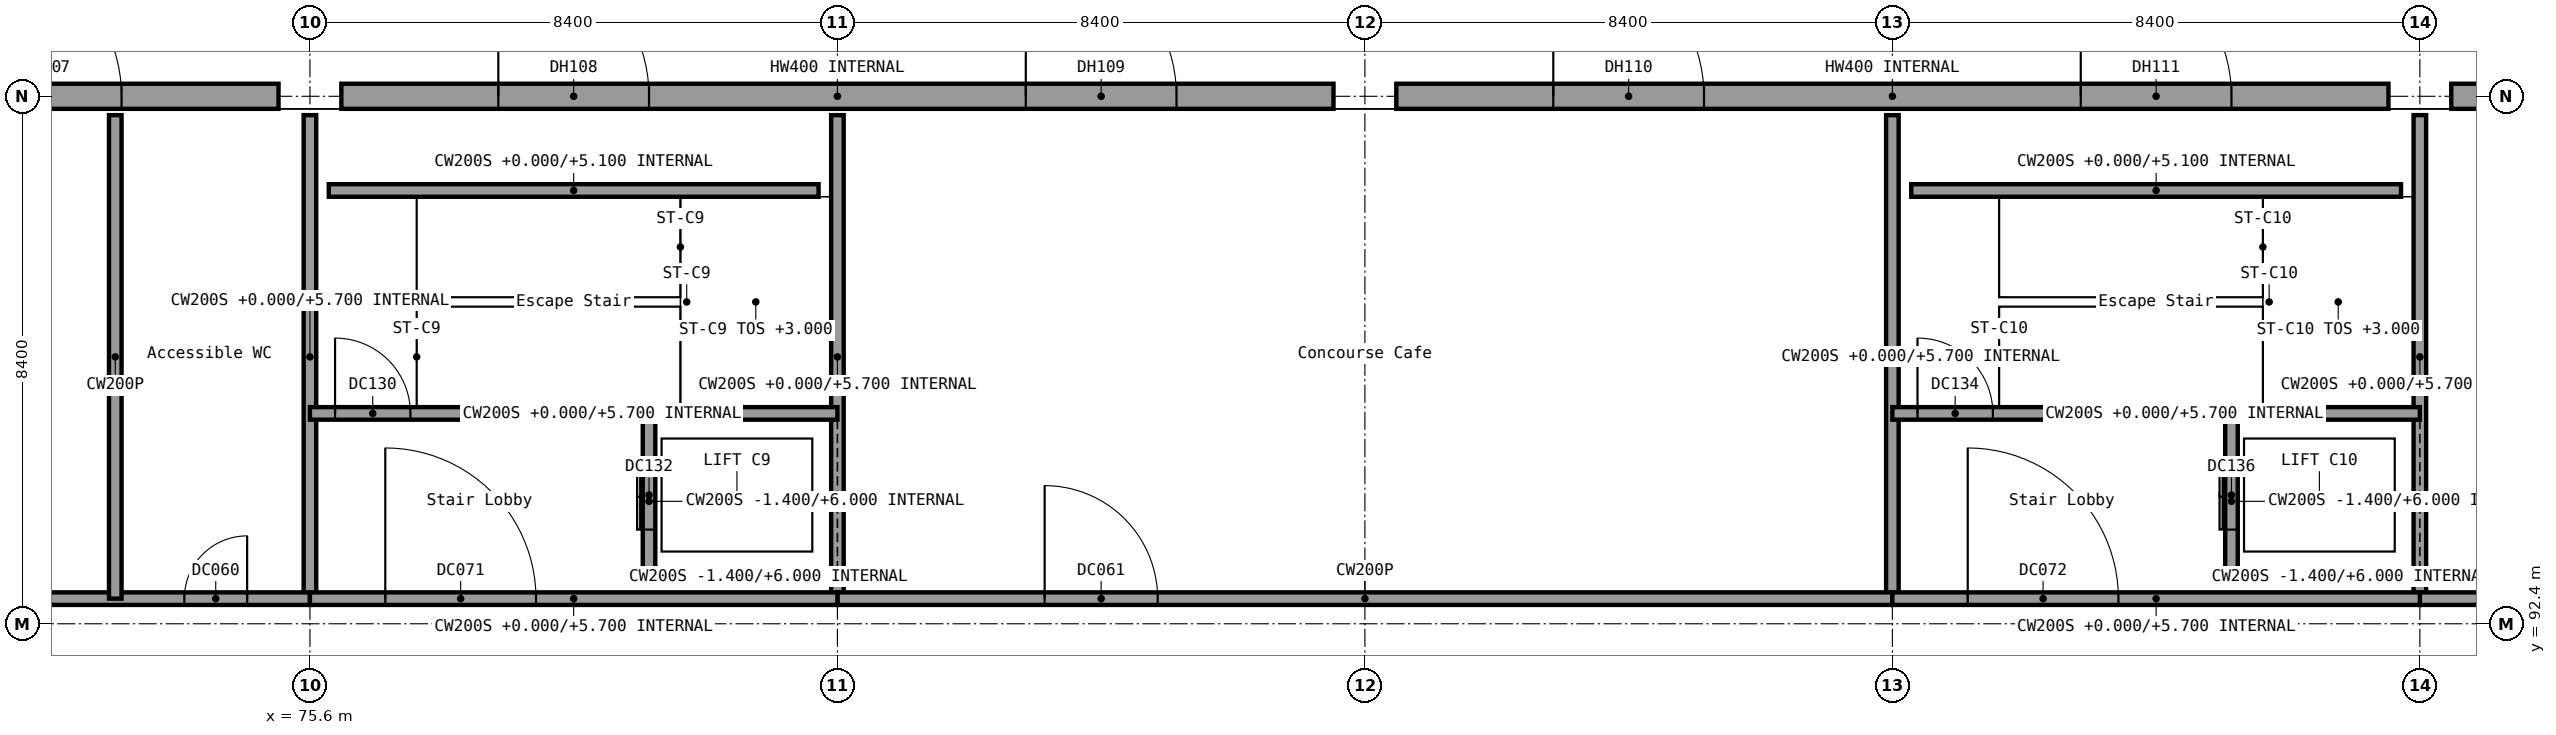
"""IFC4 building model, lengths in metres.
Left out: names, types, materials, properties, quantities, classifications, styles, units other than length and angle.
Written with IfcOpenShell. Run it as: python <this file> out.ifc"""

import sys

from ifc_helpers import new_model, si_unit, direction, frame, frame_2d, origin, origin_2d, place, context, subcontext, project, spatial, rectangle, extrude, element, fill, save


model = new_model("IFC4")
c1 = context("Model", 3, precision=1e-05, world=origin(), true_north=direction((0.0, 1.0)))
c2 = subcontext(c1, "Body", "Model", "MODEL_VIEW")
j1 = project(units=[si_unit("LENGTHUNIT", "METRE"), si_unit("PLANEANGLEUNIT", "RADIAN")], contexts=[c1])
p1 = place(None, origin())
s1 = spatial("IfcSite", under=j1, at=p1, CompositionType="ELEMENT")
p2 = place(p1, origin())
s2 = spatial("IfcBuilding", under=s1, at=p2, CompositionType="ELEMENT")
p3 = place(p2, origin())
s3 = spatial("IfcBuildingStorey", under=s2, at=p3, CompositionType="ELEMENT", Elevation=0.0)
for number, where, z_axis, x_axis in (
    (1, (75.6, 100.8, 0.0), (0.0, 0.0, 1.0), (1.0, 0.0, 0.0)),
    (2, (92.4, 100.8, 0.0), (0.0, 0.0, 1.0), (1.0, 0.0, 0.0)),
    (3, (109.2, 100.8, 0.0), (0.0, 0.0, 1.0), (1.0, 0.0, 0.0)),
):
    element("IfcColumn", number, at=place(p3, frame(where, z_axis=z_axis, x_axis=x_axis)), inside=s3, PredefinedType="COLUMN", context=c2, shape_type="SweptSolid", body=[
        extrude(rectangle(XDim=1.0, YDim=1.6, at=origin_2d()), origin(), (0.0, 0.0, 1.0), 6.0),
    ])
p4 = place(p3, frame((59.3, 100.8, 0.0), z_axis=(0.0, 0.0, 1.0), x_axis=(1.0, 0.0, 0.0)))
e4 = element("IfcWall", 4, at=p4, inside=s3, PredefinedType="STANDARD", context=c2, shape_type="SweptSolid", body=[
    extrude(rectangle(XDim=15.8, YDim=0.4, at=frame_2d((7.9, 0.0))), origin(), (0.0, 0.0, 1.0), 4.5),
])
p5 = place(p4, frame((2.5, 0.0, 0.0)))
e5 = element("IfcOpeningElement", 5, at=p5, cuts=e4, PredefinedType="OPENING", context=c2, shape_type="SweptSolid", body=[
    extrude(rectangle(XDim=2.4, YDim=2.4, at=frame_2d((1.2, 1.2))), frame((0.0, 0.2, 0.0), z_axis=(0.0, -1.0, 0.0), x_axis=(1.0, 0.0, 0.0)), (0.0, 0.0, 1.0), 0.4),
])
p6 = place(p4, frame((10.9, 0.0, 0.0)))
e6 = element("IfcOpeningElement", 6, at=p6, cuts=e4, PredefinedType="OPENING", context=c2, shape_type="SweptSolid", body=[
    extrude(rectangle(XDim=2.4, YDim=2.4, at=frame_2d((1.2, 1.2))), frame((0.0, 0.2, 0.0), z_axis=(0.0, -1.0, 0.0), x_axis=(1.0, 0.0, 0.0)), (0.0, 0.0, 1.0), 0.4),
])
p7 = place(p3, frame((76.1, 100.8, 0.0), z_axis=(0.0, 0.0, 1.0), x_axis=(1.0, 0.0, 0.0)))
e7 = element("IfcWall", 7, at=p7, inside=s3, PredefinedType="STANDARD", context=c2, shape_type="SweptSolid", body=[
    extrude(rectangle(XDim=15.8, YDim=0.4, at=frame_2d((7.9, 0.0))), origin(), (0.0, 0.0, 1.0), 4.5),
])
p8 = place(p7, frame((2.5, 0.0, 0.0)))
e8 = element("IfcOpeningElement", 8, at=p8, cuts=e7, PredefinedType="OPENING", context=c2, shape_type="SweptSolid", body=[
    extrude(rectangle(XDim=2.4, YDim=2.4, at=frame_2d((1.2, 1.2))), frame((0.0, 0.2, 0.0), z_axis=(0.0, -1.0, 0.0), x_axis=(1.0, 0.0, 0.0)), (0.0, 0.0, 1.0), 0.4),
])
p9 = place(p7, frame((10.9, 0.0, 0.0)))
e9 = element("IfcOpeningElement", 9, at=p9, cuts=e7, PredefinedType="OPENING", context=c2, shape_type="SweptSolid", body=[
    extrude(rectangle(XDim=2.4, YDim=2.4, at=frame_2d((1.2, 1.2))), frame((0.0, 0.2, 0.0), z_axis=(0.0, -1.0, 0.0), x_axis=(1.0, 0.0, 0.0)), (0.0, 0.0, 1.0), 0.4),
])
p10 = place(p3, frame((92.9, 100.8, 0.0), z_axis=(0.0, 0.0, 1.0), x_axis=(1.0, 0.0, 0.0)))
e10 = element("IfcWall", 10, at=p10, inside=s3, PredefinedType="STANDARD", context=c2, shape_type="SweptSolid", body=[
    extrude(rectangle(XDim=15.8, YDim=0.4, at=frame_2d((7.9, 0.0))), origin(), (0.0, 0.0, 1.0), 4.5),
])
p11 = place(p10, frame((2.5, 0.0, 0.0)))
e11 = element("IfcOpeningElement", 11, at=p11, cuts=e10, PredefinedType="OPENING", context=c2, shape_type="SweptSolid", body=[
    extrude(rectangle(XDim=2.4, YDim=2.4, at=frame_2d((1.2, 1.2))), frame((0.0, 0.2, 0.0), z_axis=(0.0, -1.0, 0.0), x_axis=(1.0, 0.0, 0.0)), (0.0, 0.0, 1.0), 0.4),
])
p12 = place(p10, frame((10.9, 0.0, 0.0)))
e12 = element("IfcOpeningElement", 12, at=p12, cuts=e10, PredefinedType="OPENING", context=c2, shape_type="SweptSolid", body=[
    extrude(rectangle(XDim=2.4, YDim=2.4, at=frame_2d((1.2, 1.2))), frame((0.0, 0.2, 0.0), z_axis=(0.0, -1.0, 0.0), x_axis=(1.0, 0.0, 0.0)), (0.0, 0.0, 1.0), 0.4),
])
p13 = place(p3, frame((109.7, 100.8, 0.0), z_axis=(0.0, 0.0, 1.0), x_axis=(1.0, 0.0, 0.0)))
e13 = element("IfcWall", 13, at=p13, inside=s3, PredefinedType="STANDARD", context=c2, shape_type="SweptSolid", body=[
    extrude(rectangle(XDim=15.8, YDim=0.4, at=frame_2d((7.9, 0.0))), origin(), (0.0, 0.0, 1.0), 4.5),
])
p14 = place(p13, frame((13.462, 0.0, 0.0)))
e14 = element("IfcOpeningElement", 14, at=p14, cuts=e13, PredefinedType="OPENING", context=c2, shape_type="SweptSolid", body=[
    extrude(rectangle(XDim=1.2, YDim=2.1, at=frame_2d((0.6, 1.05))), frame((0.0, 0.2, 0.0), z_axis=(0.0, -1.0, 0.0), x_axis=(1.0, 0.0, 0.0)), (0.0, 0.0, 1.0), 0.4),
])
for number, where, z_axis, x_axis in (
    (15, (75.6, 92.4, 0.0), (0.0, 0.0, 1.0), (1.0, 0.0, 0.0)),
    (16, (84.0, 92.4, 0.0), (0.0, 0.0, 1.0), (1.0, 0.0, 0.0)),
    (17, (92.4, 92.4, 0.0), (0.0, 0.0, 1.0), (1.0, 0.0, 0.0)),
    (18, (100.8, 92.4, 0.0), (0.0, 0.0, 1.0), (1.0, 0.0, 0.0)),
    (19, (109.2, 92.4, 0.0), (0.0, 0.0, 1.0), (1.0, 0.0, 0.0)),
    (20, (75.6, 99.6, 0.0), (0.0, 0.0, 1.0), (1.0, 0.0, 0.0)),
    (21, (84.0, 99.6, 0.0), (0.0, 0.0, 1.0), (1.0, 0.0, 0.0)),
    (22, (92.4, 99.6, 0.0), (0.0, 0.0, 1.0), (1.0, 0.0, 0.0)),
    (23, (100.8, 99.6, 0.0), (0.0, 0.0, 1.0), (1.0, 0.0, 0.0)),
    (24, (109.2, 99.6, 0.0), (0.0, 0.0, 1.0), (1.0, 0.0, 0.0)),
):
    element("IfcColumn", number, at=place(p3, frame(where, z_axis=z_axis, x_axis=x_axis)), inside=s3, PredefinedType="COLUMN", context=c2, shape_type="SweptSolid", body=[
        extrude(rectangle(XDim=0.6, YDim=0.6, at=origin_2d()), origin(), (0.0, 0.0, 1.0), 6.0),
    ])
for number, where, z_axis, x_axis in (
    (25, (75.6, 100.5, 0.0), (0.0, 0.0, 1.0), (0.0, -1.0, 0.0)),
    (26, (84.0, 100.5, 0.0), (0.0, 0.0, 1.0), (0.0, -1.0, 0.0)),
    (27, (100.8, 100.5, 0.0), (0.0, 0.0, 1.0), (0.0, -1.0, 0.0)),
    (28, (109.2, 100.5, 0.0), (0.0, 0.0, 1.0), (0.0, -1.0, 0.0)),
):
    element("IfcWall", number, at=place(p3, frame(where, z_axis=z_axis, x_axis=x_axis)), inside=s3, PredefinedType="SOLIDWALL", context=c2, shape_type="SweptSolid", body=[
        extrude(rectangle(XDim=7.7, YDim=0.2, at=frame_2d((3.85, 0.0))), origin(), (0.0, 0.0, 1.0), 5.7),
    ])
p15 = place(p3, frame((75.9, 99.3, 0.0), z_axis=(0.0, 0.0, 1.0), x_axis=(1.0, 0.0, 0.0)))
e29 = element("IfcWall", 29, at=p15, inside=s3, PredefinedType="SOLIDWALL", context=c2, shape_type="SweptSolid", body=[
    extrude(rectangle(XDim=7.8, YDim=0.2, at=frame_2d((3.9, 0.0))), origin(), (0.0, 0.0, 1.0), 5.1),
])
p16 = place(p3, frame((101.1, 99.3, 0.0), z_axis=(0.0, 0.0, 1.0), x_axis=(1.0, 0.0, 0.0)))
e30 = element("IfcWall", 30, at=p16, inside=s3, PredefinedType="SOLIDWALL", context=c2, shape_type="SweptSolid", body=[
    extrude(rectangle(XDim=7.8, YDim=0.2, at=frame_2d((3.9, 0.0))), origin(), (0.0, 0.0, 1.0), 5.1),
])
p17 = place(p3, frame((58.8, 92.8, 0.0), z_axis=(0.0, 0.0, 1.0), x_axis=(1.0, 0.0, 0.0)))
e31 = element("IfcWall", 31, at=p17, inside=s3, PredefinedType="PARTITIONING", context=c2, shape_type="SweptSolid", body=[
    extrude(rectangle(XDim=16.8, YDim=0.2, at=frame_2d((8.4, 0.0))), origin(), (0.0, 0.0, 1.0), 5.7),
])
p18 = place(p17, frame((3.3, 0.0, 0.0)))
e32 = element("IfcOpeningElement", 32, at=p18, cuts=e31, PredefinedType="OPENING", context=c2, shape_type="SweptSolid", body=[
    extrude(rectangle(XDim=1.8, YDim=2.4, at=frame_2d((0.9, 1.2))), frame((0.0, 0.1, 0.0), z_axis=(0.0, -1.0, 0.0), x_axis=(1.0, 0.0, 0.0)), (0.0, 0.0, 1.0), 0.2),
])
p19 = place(p17, frame((14.8, 0.0, 0.0)))
e33 = element("IfcOpeningElement", 33, at=p19, cuts=e31, PredefinedType="OPENING", context=c2, shape_type="SweptSolid", body=[
    extrude(rectangle(XDim=1.0, YDim=2.4, at=frame_2d((0.5, 1.2))), frame((0.0, 0.1, 0.0), z_axis=(0.0, -1.0, 0.0), x_axis=(1.0, 0.0, 0.0)), (0.0, 0.0, 1.0), 0.2),
])
p20 = place(p3, frame((72.5, 100.5, 0.0), z_axis=(0.0, 0.0, 1.0), x_axis=(0.0, -1.0, 0.0)))
e34 = element("IfcWall", 34, at=p20, inside=s3, PredefinedType="PARTITIONING", context=c2, shape_type="SweptSolid", body=[
    extrude(rectangle(XDim=7.7, YDim=0.2, at=frame_2d((3.85, 0.0))), origin(), (0.0, 0.0, 1.0), 5.7),
])
p21 = place(p3, frame((84.0, 92.8, 0.0), z_axis=(0.0, 0.0, 1.0), x_axis=(1.0, 0.0, 0.0)))
e35 = element("IfcWall", 35, at=p21, inside=s3, PredefinedType="PARTITIONING", context=c2, shape_type="SweptSolid", body=[
    extrude(rectangle(XDim=16.8, YDim=0.2, at=frame_2d((8.4, 0.0))), origin(), (0.0, 0.0, 1.0), 5.7),
])
p22 = place(p21, frame((3.3, 0.0, 0.0)))
e36 = element("IfcOpeningElement", 36, at=p22, cuts=e35, PredefinedType="OPENING", context=c2, shape_type="SweptSolid", body=[
    extrude(rectangle(XDim=1.8, YDim=2.4, at=frame_2d((0.9, 1.2))), frame((0.0, 0.1, 0.0), z_axis=(0.0, -1.0, 0.0), x_axis=(1.0, 0.0, 0.0)), (0.0, 0.0, 1.0), 0.2),
])
p23 = place(p3, frame((109.2, 92.8, 0.0), z_axis=(0.0, 0.0, 1.0), x_axis=(1.0, 0.0, 0.0)))
e37 = element("IfcWall", 37, at=p23, inside=s3, PredefinedType="PARTITIONING", context=c2, shape_type="SweptSolid", body=[
    extrude(rectangle(XDim=16.8, YDim=0.2, at=frame_2d((8.4, 0.0))), origin(), (0.0, 0.0, 1.0), 5.7),
])
p24 = place(p23, frame((3.3, 0.0, 0.0)))
e38 = element("IfcOpeningElement", 38, at=p24, cuts=e37, PredefinedType="OPENING", context=c2, shape_type="SweptSolid", body=[
    extrude(rectangle(XDim=1.8, YDim=2.4, at=frame_2d((0.9, 1.2))), frame((0.0, 0.1, 0.0), z_axis=(0.0, -1.0, 0.0), x_axis=(1.0, 0.0, 0.0)), (0.0, 0.0, 1.0), 0.2),
])
p25 = place(p3, frame((75.6, 92.8, 0.0), z_axis=(0.0, 0.0, 1.0), x_axis=(1.0, 0.0, 0.0)))
e39 = element("IfcWall", 39, at=p25, inside=s3, PredefinedType="SOLIDWALL", context=c2, shape_type="SweptSolid", body=[
    extrude(rectangle(XDim=8.4, YDim=0.2, at=frame_2d((4.2, 0.0))), origin(), (0.0, 0.0, 1.0), 5.7),
])
p26 = place(p25, frame((1.2, 0.0, 0.0)))
e40 = element("IfcOpeningElement", 40, at=p26, cuts=e39, PredefinedType="OPENING", context=c2, shape_type="SweptSolid", body=[
    extrude(rectangle(XDim=2.4, YDim=2.4, at=frame_2d((1.2, 1.2))), frame((0.0, 0.1, 0.0), z_axis=(0.0, -1.0, 0.0), x_axis=(1.0, 0.0, 0.0)), (0.0, 0.0, 1.0), 0.2),
])
p27 = place(p3, frame((100.8, 92.8, 0.0), z_axis=(0.0, 0.0, 1.0), x_axis=(1.0, 0.0, 0.0)))
e41 = element("IfcWall", 41, at=p27, inside=s3, PredefinedType="SOLIDWALL", context=c2, shape_type="SweptSolid", body=[
    extrude(rectangle(XDim=8.4, YDim=0.2, at=frame_2d((4.2, 0.0))), origin(), (0.0, 0.0, 1.0), 5.7),
])
p28 = place(p27, frame((1.2, 0.0, 0.0)))
e42 = element("IfcOpeningElement", 42, at=p28, cuts=e41, PredefinedType="OPENING", context=c2, shape_type="SweptSolid", body=[
    extrude(rectangle(XDim=2.4, YDim=2.4, at=frame_2d((1.2, 1.2))), frame((0.0, 0.1, 0.0), z_axis=(0.0, -1.0, 0.0), x_axis=(1.0, 0.0, 0.0)), (0.0, 0.0, 1.0), 0.2),
])
p29 = place(p3, frame((75.6, 95.75, 0.0), z_axis=(0.0, 0.0, 1.0), x_axis=(1.0, 0.0, 0.0)))
e43 = element("IfcWall", 43, at=p29, inside=s3, PredefinedType="SOLIDWALL", context=c2, shape_type="SweptSolid", body=[
    extrude(rectangle(XDim=8.4, YDim=0.2, at=frame_2d((4.2, 0.0))), origin(), (0.0, 0.0, 1.0), 5.7),
])
p30 = place(p29, frame((0.4, 0.0, 0.0)))
e44 = element("IfcOpeningElement", 44, at=p30, cuts=e43, PredefinedType="OPENING", context=c2, shape_type="SweptSolid", body=[
    extrude(rectangle(XDim=1.2, YDim=2.4, at=frame_2d((0.6, 1.2))), frame((0.0, 0.1, 0.0), z_axis=(0.0, -1.0, 0.0), x_axis=(1.0, 0.0, 0.0)), (0.0, 0.0, 1.0), 0.2),
])
p31 = place(p3, frame((81.0, 93.05, -1.4), z_axis=(0.0, 0.0, 1.0), x_axis=(0.0, 1.0, 0.0)))
e45 = element("IfcWall", 45, at=p31, inside=s3, PredefinedType="SOLIDWALL", context=c2, shape_type="SweptSolid", body=[
    extrude(rectangle(XDim=2.6, YDim=0.2, at=frame_2d((1.3, 0.0))), origin(), (0.0, 0.0, 1.0), 7.4),
])
p32 = place(p31, frame((0.85, 0.0, 1.4)))
e46 = element("IfcOpeningElement", 46, at=p32, cuts=e45, PredefinedType="OPENING", context=c2, shape_type="SweptSolid", body=[
    extrude(rectangle(XDim=1.1, YDim=2.1, at=frame_2d((0.55, 1.05))), frame((0.0, 0.1, 0.0), z_axis=(0.0, -1.0, 0.0), x_axis=(1.0, 0.0, 0.0)), (0.0, 0.0, 1.0), 0.2),
])
p33 = place(p3, frame((80.9, 93.15, -1.4), z_axis=(0.0, 0.0, 1.0), x_axis=(1.0, 0.0, 0.0)))
e47 = element("IfcWall", 47, at=p33, inside=s3, PredefinedType="SOLIDWALL", context=c2, shape_type="SweptSolid", body=[
    extrude(rectangle(XDim=3.1, YDim=0.2, at=frame_2d((1.55, 0.0))), origin(), (0.0, 0.0, 1.0), 7.4),
])
p34 = place(p3, frame((100.8, 95.75, 0.0), z_axis=(0.0, 0.0, 1.0), x_axis=(1.0, 0.0, 0.0)))
e48 = element("IfcWall", 48, at=p34, inside=s3, PredefinedType="SOLIDWALL", context=c2, shape_type="SweptSolid", body=[
    extrude(rectangle(XDim=8.4, YDim=0.2, at=frame_2d((4.2, 0.0))), origin(), (0.0, 0.0, 1.0), 5.7),
])
p35 = place(p34, frame((0.4, 0.0, 0.0)))
e49 = element("IfcOpeningElement", 49, at=p35, cuts=e48, PredefinedType="OPENING", context=c2, shape_type="SweptSolid", body=[
    extrude(rectangle(XDim=1.2, YDim=2.4, at=frame_2d((0.6, 1.2))), frame((0.0, 0.1, 0.0), z_axis=(0.0, -1.0, 0.0), x_axis=(1.0, 0.0, 0.0)), (0.0, 0.0, 1.0), 0.2),
])
p36 = place(p3, frame((106.2, 93.05, -1.4), z_axis=(0.0, 0.0, 1.0), x_axis=(0.0, 1.0, 0.0)))
e50 = element("IfcWall", 50, at=p36, inside=s3, PredefinedType="SOLIDWALL", context=c2, shape_type="SweptSolid", body=[
    extrude(rectangle(XDim=2.6, YDim=0.2, at=frame_2d((1.3, 0.0))), origin(), (0.0, 0.0, 1.0), 7.4),
])
p37 = place(p36, frame((0.85, 0.0, 1.4)))
e51 = element("IfcOpeningElement", 51, at=p37, cuts=e50, PredefinedType="OPENING", context=c2, shape_type="SweptSolid", body=[
    extrude(rectangle(XDim=1.1, YDim=2.1, at=frame_2d((0.55, 1.05))), frame((0.0, 0.1, 0.0), z_axis=(0.0, -1.0, 0.0), x_axis=(1.0, 0.0, 0.0)), (0.0, 0.0, 1.0), 0.2),
])
p38 = place(p3, frame((106.1, 93.15, -1.4), z_axis=(0.0, 0.0, 1.0), x_axis=(1.0, 0.0, 0.0)))
e52 = element("IfcWall", 52, at=p38, inside=s3, PredefinedType="SOLIDWALL", context=c2, shape_type="SweptSolid", body=[
    extrude(rectangle(XDim=3.1, YDim=0.2, at=frame_2d((1.55, 0.0))), origin(), (0.0, 0.0, 1.0), 7.4),
])
p39 = place(p6, origin())
e53 = element("IfcDoor", 53, at=p39, inside=s3, OperationType="DOUBLE_DOOR_SINGLE_SWING", PredefinedType="DOOR", context=c2, shape_type="SweptSolid", body=[
    extrude(rectangle(XDim=2.4, YDim=2.4, at=frame_2d((1.2, 1.2))), frame((0.0, 0.025, 0.0), z_axis=(0.0, -1.0, 0.0), x_axis=(1.0, 0.0, 0.0)), (0.0, 0.0, 1.0), 0.05),
])
fill(e6, e53)
p40 = place(p8, origin())
e54 = element("IfcDoor", 54, at=p40, inside=s3, OperationType="DOUBLE_DOOR_SINGLE_SWING", PredefinedType="DOOR", context=c2, shape_type="SweptSolid", body=[
    extrude(rectangle(XDim=2.4, YDim=2.4, at=frame_2d((1.2, 1.2))), frame((0.0, 0.025, 0.0), z_axis=(0.0, -1.0, 0.0), x_axis=(1.0, 0.0, 0.0)), (0.0, 0.0, 1.0), 0.05),
])
fill(e8, e54)
p41 = place(p9, origin())
e55 = element("IfcDoor", 55, at=p41, inside=s3, OperationType="DOUBLE_DOOR_SINGLE_SWING", PredefinedType="DOOR", context=c2, shape_type="SweptSolid", body=[
    extrude(rectangle(XDim=2.4, YDim=2.4, at=frame_2d((1.2, 1.2))), frame((0.0, 0.025, 0.0), z_axis=(0.0, -1.0, 0.0), x_axis=(1.0, 0.0, 0.0)), (0.0, 0.0, 1.0), 0.05),
])
fill(e9, e55)
p42 = place(p11, origin())
e56 = element("IfcDoor", 56, at=p42, inside=s3, OperationType="DOUBLE_DOOR_SINGLE_SWING", PredefinedType="DOOR", context=c2, shape_type="SweptSolid", body=[
    extrude(rectangle(XDim=2.4, YDim=2.4, at=frame_2d((1.2, 1.2))), frame((0.0, 0.025, 0.0), z_axis=(0.0, -1.0, 0.0), x_axis=(1.0, 0.0, 0.0)), (0.0, 0.0, 1.0), 0.05),
])
fill(e11, e56)
p43 = place(p12, origin())
e57 = element("IfcDoor", 57, at=p43, inside=s3, OperationType="DOUBLE_DOOR_SINGLE_SWING", PredefinedType="DOOR", context=c2, shape_type="SweptSolid", body=[
    extrude(rectangle(XDim=2.4, YDim=2.4, at=frame_2d((1.2, 1.2))), frame((0.0, 0.025, 0.0), z_axis=(0.0, -1.0, 0.0), x_axis=(1.0, 0.0, 0.0)), (0.0, 0.0, 1.0), 0.05),
])
fill(e12, e57)
p44 = place(p19, origin())
e58 = element("IfcDoor", 58, at=p44, inside=s3, OperationType="SINGLE_SWING_RIGHT", PredefinedType="DOOR", context=c2, shape_type="SweptSolid", body=[
    extrude(rectangle(XDim=1.0, YDim=2.4, at=frame_2d((0.5, 1.2))), frame((0.0, 0.025, 0.0), z_axis=(0.0, -1.0, 0.0), x_axis=(1.0, 0.0, 0.0)), (0.0, 0.0, 1.0), 0.05),
])
fill(e33, e58)
p45 = place(p22, origin())
e59 = element("IfcDoor", 59, at=p45, inside=s3, OperationType="DOUBLE_DOOR_DOUBLE_SWING", PredefinedType="DOOR", context=c2, shape_type="SweptSolid", body=[
    extrude(rectangle(XDim=1.8, YDim=2.4, at=frame_2d((0.9, 1.2))), frame((0.0, 0.025, 0.0), z_axis=(0.0, -1.0, 0.0), x_axis=(1.0, 0.0, 0.0)), (0.0, 0.0, 1.0), 0.05),
])
fill(e36, e59)
p46 = place(p26, origin())
e60 = element("IfcDoor", 60, at=p46, inside=s3, OperationType="DOUBLE_DOOR_DOUBLE_SWING", PredefinedType="DOOR", context=c2, shape_type="SweptSolid", body=[
    extrude(rectangle(XDim=2.4, YDim=2.4, at=frame_2d((1.2, 1.2))), frame((0.0, 0.025, 0.0), z_axis=(0.0, -1.0, 0.0), x_axis=(1.0, 0.0, 0.0)), (0.0, 0.0, 1.0), 0.05),
])
fill(e40, e60)
p47 = place(p28, origin())
e61 = element("IfcDoor", 61, at=p47, inside=s3, OperationType="DOUBLE_DOOR_DOUBLE_SWING", PredefinedType="DOOR", context=c2, shape_type="SweptSolid", body=[
    extrude(rectangle(XDim=2.4, YDim=2.4, at=frame_2d((1.2, 1.2))), frame((0.0, 0.025, 0.0), z_axis=(0.0, -1.0, 0.0), x_axis=(1.0, 0.0, 0.0)), (0.0, 0.0, 1.0), 0.05),
])
fill(e42, e61)
p48 = place(p30, origin())
e62 = element("IfcDoor", 62, at=p48, inside=s3, OperationType="SINGLE_SWING_LEFT", PredefinedType="DOOR", context=c2, shape_type="SweptSolid", body=[
    extrude(rectangle(XDim=1.2, YDim=2.4, at=frame_2d((0.6, 1.2))), frame((0.0, 0.025, 0.0), z_axis=(0.0, -1.0, 0.0), x_axis=(1.0, 0.0, 0.0)), (0.0, 0.0, 1.0), 0.05),
])
fill(e44, e62)
p49 = place(p32, origin())
e63 = element("IfcDoor", 63, at=p49, inside=s3, OperationType="DOUBLE_DOOR_SLIDING", PredefinedType="DOOR", context=c2, shape_type="SweptSolid", body=[
    extrude(rectangle(XDim=1.1, YDim=2.1, at=frame_2d((0.55, 1.05))), frame((0.0, 0.025, 0.0), z_axis=(0.0, -1.0, 0.0), x_axis=(1.0, 0.0, 0.0)), (0.0, 0.0, 1.0), 0.05),
])
fill(e46, e63)
p50 = place(p35, origin())
e64 = element("IfcDoor", 64, at=p50, inside=s3, OperationType="SINGLE_SWING_LEFT", PredefinedType="DOOR", context=c2, shape_type="SweptSolid", body=[
    extrude(rectangle(XDim=1.2, YDim=2.4, at=frame_2d((0.6, 1.2))), frame((0.0, 0.025, 0.0), z_axis=(0.0, -1.0, 0.0), x_axis=(1.0, 0.0, 0.0)), (0.0, 0.0, 1.0), 0.05),
])
fill(e49, e64)
p51 = place(p37, origin())
e65 = element("IfcDoor", 65, at=p51, inside=s3, OperationType="DOUBLE_DOOR_SLIDING", PredefinedType="DOOR", context=c2, shape_type="SweptSolid", body=[
    extrude(rectangle(XDim=1.1, YDim=2.1, at=frame_2d((0.55, 1.05))), frame((0.0, 0.025, 0.0), z_axis=(0.0, -1.0, 0.0), x_axis=(1.0, 0.0, 0.0)), (0.0, 0.0, 1.0), 0.05),
])
fill(e51, e65)
save(model, sys.argv[1])
